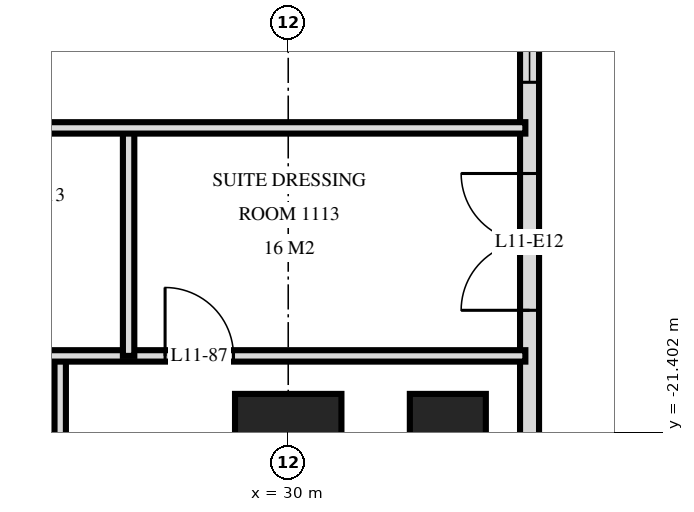
"""IFC4 building model, lengths in metres.
Left out: names, types, materials, properties, quantities, classifications, styles, units other than length and angle.
Written with IfcOpenShell. Run it as: python <this file> out.ifc"""

import sys

from ifc_helpers import new_model, si_unit, direction, frame, frame_2d, origin, origin_2d, place, context, subcontext, project, spatial, rectangle, extrude, element, fill, save


model = new_model("IFC4")
c1 = context("Model", 3, precision=1e-05, world=origin(), true_north=direction((0.0, 1.0)))
c2 = subcontext(c1, "Body", "Model", "MODEL_VIEW")
j1 = project(units=[si_unit("LENGTHUNIT", "METRE"), si_unit("PLANEANGLEUNIT", "RADIAN")], contexts=[c1])
p1 = place(None, origin())
s1 = spatial("IfcSite", under=j1, at=p1, CompositionType="ELEMENT")
p2 = place(p1, origin())
s2 = spatial("IfcBuilding", under=s1, at=p2, CompositionType="ELEMENT")
p3 = place(p2, frame((0.0, 0.0, 49.2)))
s3 = spatial("IfcBuildingStorey", under=s2, at=p3, CompositionType="ELEMENT", Elevation=49.2)
p4 = place(p3, frame((30.0, -21.6, 0.0), z_axis=(0.0, 0.0, 1.0), x_axis=(1.0, 0.0, 0.0)))
e1 = element("IfcColumn", 1, at=p4, inside=s3, PredefinedType="COLUMN", context=c2, shape_type="SweptSolid", body=[
    extrude(rectangle(XDim=1.4, YDim=1.4, at=origin_2d()), origin(), (0.0, 0.0, 1.0), 3.6),
])
p5 = place(p3, frame((32.1, -21.6, 0.0), z_axis=(0.0, 0.0, 1.0), x_axis=(0.0, 1.0, 0.0)))
e2 = element("IfcColumn", 2, at=p5, inside=s3, PredefinedType="COLUMN", context=c2, shape_type="SweptSolid", body=[
    extrude(rectangle(XDim=1.4, YDim=1.0, at=origin_2d()), origin(), (0.0, 0.0, 1.0), 3.6),
])
p6 = place(p3, frame((33.175, -24.875, 0.0), z_axis=(0.0, 0.0, 1.0), x_axis=(0.0, 1.0, 0.0)))
e3 = element("IfcWall", 3, at=p6, inside=s3, PredefinedType="SOLIDWALL", context=c2, shape_type="SweptSolid", body=[
    extrude(rectangle(XDim=21.551, YDim=0.25, at=frame_2d((10.775, 0.0))), origin(), (0.0, 0.0, 1.0), 3.32),
])
p7 = place(p6, frame((0.575, 0.0, 0.0)))
e4 = element("IfcOpeningElement", 4, at=p7, cuts=e3, PredefinedType="OPENING", context=c2, shape_type="SweptSolid", body=[
    extrude(rectangle(XDim=1.8, YDim=2.4, at=frame_2d((0.9, 1.2))), frame((0.0, 0.135, 0.0), z_axis=(0.0, -1.0, 0.0), x_axis=(1.0, 0.0, 0.0)), (0.0, 0.0, 1.0), 0.27),
])
p8 = place(p6, frame((5.075, 0.0, 0.0)))
e5 = element("IfcOpeningElement", 5, at=p8, cuts=e3, PredefinedType="OPENING", context=c2, shape_type="SweptSolid", body=[
    extrude(rectangle(XDim=1.8, YDim=2.4, at=frame_2d((0.9, 1.2))), frame((0.0, 0.135, 0.0), z_axis=(0.0, -1.0, 0.0), x_axis=(1.0, 0.0, 0.0)), (0.0, 0.0, 1.0), 0.27),
])
p9 = place(p6, frame((8.075, 0.0, 0.3)))
e6 = element("IfcOpeningElement", 6, at=p9, cuts=e3, PredefinedType="OPENING", context=c2, shape_type="SweptSolid", body=[
    extrude(rectangle(XDim=1.2, YDim=2.1, at=frame_2d((0.6, 1.05))), frame((0.0, 0.135, 0.0), z_axis=(0.0, -1.0, 0.0), x_axis=(1.0, 0.0, 0.0)), (0.0, 0.0, 1.0), 0.27),
])
p10 = place(p6, frame((13.1, 0.0, 0.0)))
e7 = element("IfcOpeningElement", 7, at=p10, cuts=e3, PredefinedType="OPENING", context=c2, shape_type="SweptSolid", body=[
    extrude(rectangle(XDim=1.8, YDim=2.4, at=frame_2d((0.9, 1.2))), frame((0.0, 0.135, 0.0), z_axis=(0.0, -1.0, 0.0), x_axis=(1.0, 0.0, 0.0)), (0.0, 0.0, 1.0), 0.27),
])
p11 = place(p3, frame((27.9, -20.4, 0.0), z_axis=(0.0, 0.0, 1.0), x_axis=(0.0, 1.0, 0.0)))
e8 = element("IfcWall", 8, at=p11, inside=s3, PredefinedType="PARTITIONING", context=c2, shape_type="SweptSolid", body=[
    extrude(rectangle(XDim=3.0, YDim=0.15, at=frame_2d((1.5, 0.0))), origin(), (0.0, 0.0, 1.0), 3.32),
])
p12 = place(p3, frame((27.0, -29.22, 0.0), z_axis=(0.0, 0.0, 1.0), x_axis=(0.0, 1.0, 0.0)))
e9 = element("IfcWall", 9, at=p12, inside=s3, PredefinedType="PARTITIONING", context=c2, shape_type="SweptSolid", body=[
    extrude(rectangle(XDim=8.82, YDim=0.15, at=frame_2d((4.41, 0.0))), origin(), (0.0, 0.0, 1.0), 3.32),
])
p13 = place(p12, frame((3.87, 0.0, 0.0)))
e10 = element("IfcOpeningElement", 10, at=p13, cuts=e9, PredefinedType="OPENING", context=c2, shape_type="SweptSolid", body=[
    extrude(rectangle(XDim=0.9, YDim=2.1, at=frame_2d((0.45, 1.05))), frame((0.0, 0.085, 0.0), z_axis=(0.0, -1.0, 0.0), x_axis=(1.0, 0.0, 0.0)), (0.0, 0.0, 1.0), 0.17),
])
p14 = place(p3, frame((24.9, -20.4, 0.0), z_axis=(0.0, 0.0, 1.0), x_axis=(1.0, 0.0, 0.0)))
e11 = element("IfcWall", 11, at=p14, inside=s3, PredefinedType="PARTITIONING", context=c2, shape_type="SweptSolid", body=[
    extrude(rectangle(XDim=8.22, YDim=0.15, at=frame_2d((4.11, 0.0))), origin(), (0.0, 0.0, 1.0), 3.32),
])
p15 = place(p14, frame((0.63, 0.0, 0.0)))
e12 = element("IfcOpeningElement", 12, at=p15, cuts=e11, PredefinedType="OPENING", context=c2, shape_type="SweptSolid", body=[
    extrude(rectangle(XDim=0.8, YDim=2.1, at=frame_2d((0.4, 1.05))), frame((0.0, 0.085, 0.0), z_axis=(0.0, -1.0, 0.0), x_axis=(1.0, 0.0, 0.0)), (0.0, 0.0, 1.0), 0.17),
])
p16 = place(p14, frame((3.48, 0.0, 0.0)))
e13 = element("IfcOpeningElement", 13, at=p16, cuts=e11, PredefinedType="OPENING", context=c2, shape_type="SweptSolid", body=[
    extrude(rectangle(XDim=0.9, YDim=2.1, at=frame_2d((0.45, 1.05))), frame((0.0, 0.085, 0.0), z_axis=(0.0, -1.0, 0.0), x_axis=(1.0, 0.0, 0.0)), (0.0, 0.0, 1.0), 0.17),
])
p17 = place(p3, frame((-33.12, -17.4, 0.0), z_axis=(0.0, 0.0, 1.0), x_axis=(1.0, 0.0, 0.0)))
e14 = element("IfcWall", 14, at=p17, inside=s3, PredefinedType="PARTITIONING", context=c2, shape_type="SweptSolid", body=[
    extrude(rectangle(XDim=66.24, YDim=0.15, at=frame_2d((33.12, 0.0))), origin(), (0.0, 0.0, 1.0), 3.32),
])
p18 = place(p17, frame((9.27, 0.0, 0.0)))
e15 = element("IfcOpeningElement", 15, at=p18, cuts=e14, PredefinedType="OPENING", context=c2, shape_type="SweptSolid", body=[
    extrude(rectangle(XDim=1.0, YDim=2.1, at=frame_2d((0.5, 1.05))), frame((0.0, 0.085, 0.0), z_axis=(0.0, -1.0, 0.0), x_axis=(1.0, 0.0, 0.0)), (0.0, 0.0, 1.0), 0.17),
])
p19 = place(p17, frame((13.97, 0.0, 0.0)))
e16 = element("IfcOpeningElement", 16, at=p19, cuts=e14, PredefinedType="OPENING", context=c2, shape_type="SweptSolid", body=[
    extrude(rectangle(XDim=1.0, YDim=2.1, at=frame_2d((0.5, 1.05))), frame((0.0, 0.085, 0.0), z_axis=(0.0, -1.0, 0.0), x_axis=(1.0, 0.0, 0.0)), (0.0, 0.0, 1.0), 0.17),
])
p20 = place(p17, frame((15.27, 0.0, 0.0)))
e17 = element("IfcOpeningElement", 17, at=p20, cuts=e14, PredefinedType="OPENING", context=c2, shape_type="SweptSolid", body=[
    extrude(rectangle(XDim=1.0, YDim=2.1, at=frame_2d((0.5, 1.05))), frame((0.0, 0.085, 0.0), z_axis=(0.0, -1.0, 0.0), x_axis=(1.0, 0.0, 0.0)), (0.0, 0.0, 1.0), 0.17),
])
p21 = place(p17, frame((19.97, 0.0, 0.0)))
e18 = element("IfcOpeningElement", 18, at=p21, cuts=e14, PredefinedType="OPENING", context=c2, shape_type="SweptSolid", body=[
    extrude(rectangle(XDim=1.0, YDim=2.1, at=frame_2d((0.5, 1.05))), frame((0.0, 0.085, 0.0), z_axis=(0.0, -1.0, 0.0), x_axis=(1.0, 0.0, 0.0)), (0.0, 0.0, 1.0), 0.17),
])
p22 = place(p17, frame((22.27, 0.0, 0.0)))
e19 = element("IfcOpeningElement", 19, at=p22, cuts=e14, PredefinedType="OPENING", context=c2, shape_type="SweptSolid", body=[
    extrude(rectangle(XDim=1.0, YDim=2.1, at=frame_2d((0.5, 1.05))), frame((0.0, 0.085, 0.0), z_axis=(0.0, -1.0, 0.0), x_axis=(1.0, 0.0, 0.0)), (0.0, 0.0, 1.0), 0.17),
])
p23 = place(p17, frame((28.97, 0.0, 0.0)))
e20 = element("IfcOpeningElement", 20, at=p23, cuts=e14, PredefinedType="OPENING", context=c2, shape_type="SweptSolid", body=[
    extrude(rectangle(XDim=1.0, YDim=2.1, at=frame_2d((0.5, 1.05))), frame((0.0, 0.085, 0.0), z_axis=(0.0, -1.0, 0.0), x_axis=(1.0, 0.0, 0.0)), (0.0, 0.0, 1.0), 0.17),
])
p24 = place(p17, frame((30.27, 0.0, 0.0)))
e21 = element("IfcOpeningElement", 21, at=p24, cuts=e14, PredefinedType="OPENING", context=c2, shape_type="SweptSolid", body=[
    extrude(rectangle(XDim=1.0, YDim=2.1, at=frame_2d((0.5, 1.05))), frame((0.0, 0.085, 0.0), z_axis=(0.0, -1.0, 0.0), x_axis=(1.0, 0.0, 0.0)), (0.0, 0.0, 1.0), 0.17),
])
p25 = place(p17, frame((34.97, 0.0, 0.0)))
e22 = element("IfcOpeningElement", 22, at=p25, cuts=e14, PredefinedType="OPENING", context=c2, shape_type="SweptSolid", body=[
    extrude(rectangle(XDim=1.0, YDim=2.1, at=frame_2d((0.5, 1.05))), frame((0.0, 0.085, 0.0), z_axis=(0.0, -1.0, 0.0), x_axis=(1.0, 0.0, 0.0)), (0.0, 0.0, 1.0), 0.17),
])
p26 = place(p17, frame((36.27, 0.0, 0.0)))
e23 = element("IfcOpeningElement", 23, at=p26, cuts=e14, PredefinedType="OPENING", context=c2, shape_type="SweptSolid", body=[
    extrude(rectangle(XDim=1.0, YDim=2.1, at=frame_2d((0.5, 1.05))), frame((0.0, 0.085, 0.0), z_axis=(0.0, -1.0, 0.0), x_axis=(1.0, 0.0, 0.0)), (0.0, 0.0, 1.0), 0.17),
])
p27 = place(p17, frame((39.82, 0.0, 0.0)))
e24 = element("IfcOpeningElement", 24, at=p27, cuts=e14, PredefinedType="OPENING", context=c2, shape_type="SweptSolid", body=[
    extrude(rectangle(XDim=1.0, YDim=2.1, at=frame_2d((0.5, 1.05))), frame((0.0, 0.085, 0.0), z_axis=(0.0, -1.0, 0.0), x_axis=(1.0, 0.0, 0.0)), (0.0, 0.0, 1.0), 0.17),
])
p28 = place(p17, frame((51.27, 0.0, 0.0)))
e25 = element("IfcOpeningElement", 25, at=p28, cuts=e14, PredefinedType="OPENING", context=c2, shape_type="SweptSolid", body=[
    extrude(rectangle(XDim=1.0, YDim=2.1, at=frame_2d((0.5, 1.05))), frame((0.0, 0.085, 0.0), z_axis=(0.0, -1.0, 0.0), x_axis=(1.0, 0.0, 0.0)), (0.0, 0.0, 1.0), 0.17),
])
p29 = place(p17, frame((4.42, 0.0, 0.0)))
e26 = element("IfcOpeningElement", 26, at=p29, cuts=e14, PredefinedType="OPENING", context=c2, shape_type="SweptSolid", body=[
    extrude(rectangle(XDim=1.0, YDim=2.1, at=frame_2d((0.5, 1.05))), frame((0.0, 0.085, 0.0), z_axis=(0.0, -1.0, 0.0), x_axis=(1.0, 0.0, 0.0)), (0.0, 0.0, 1.0), 0.17),
])
p30 = place(p17, frame((54.82, 0.0, 0.0)))
e27 = element("IfcOpeningElement", 27, at=p30, cuts=e14, PredefinedType="OPENING", context=c2, shape_type="SweptSolid", body=[
    extrude(rectangle(XDim=1.0, YDim=2.1, at=frame_2d((0.5, 1.05))), frame((0.0, 0.085, 0.0), z_axis=(0.0, -1.0, 0.0), x_axis=(1.0, 0.0, 0.0)), (0.0, 0.0, 1.0), 0.17),
])
p31 = place(p8, origin())
e28 = element("IfcDoor", 28, at=p31, inside=s3, OperationType="DOUBLE_DOOR_SINGLE_SWING", PredefinedType="DOOR", context=c2, shape_type="SweptSolid", body=[
    extrude(rectangle(XDim=1.8, YDim=2.4, at=frame_2d((0.9, 1.2))), frame((0.0, 0.025, 0.0), z_axis=(0.0, -1.0, 0.0), x_axis=(1.0, 0.0, 0.0)), (0.0, 0.0, 1.0), 0.05),
])
fill(e5, e28)
p32 = place(p9, origin())
e29 = element("IfcWindow", 29, at=p32, inside=s3, PartitioningType="SINGLE_PANEL", PredefinedType="WINDOW", context=c2, shape_type="SweptSolid", body=[
    extrude(rectangle(XDim=1.2, YDim=2.1, at=frame_2d((0.6, 1.05))), frame((0.0, 0.03, 0.0), z_axis=(0.0, -1.0, 0.0), x_axis=(1.0, 0.0, 0.0)), (0.0, 0.0, 1.0), 0.06),
])
fill(e6, e29)
p33 = place(p16, origin())
e30 = element("IfcDoor", 30, at=p33, inside=s3, OperationType="SINGLE_SWING_RIGHT", PredefinedType="DOOR", context=c2, shape_type="SweptSolid", body=[
    extrude(rectangle(XDim=0.9, YDim=2.1, at=frame_2d((0.45, 1.05))), frame((0.0, 0.025, 0.0), z_axis=(0.0, -1.0, 0.0), x_axis=(1.0, 0.0, 0.0)), (0.0, 0.0, 1.0), 0.05),
])
fill(e13, e30)
save(model, sys.argv[1])
